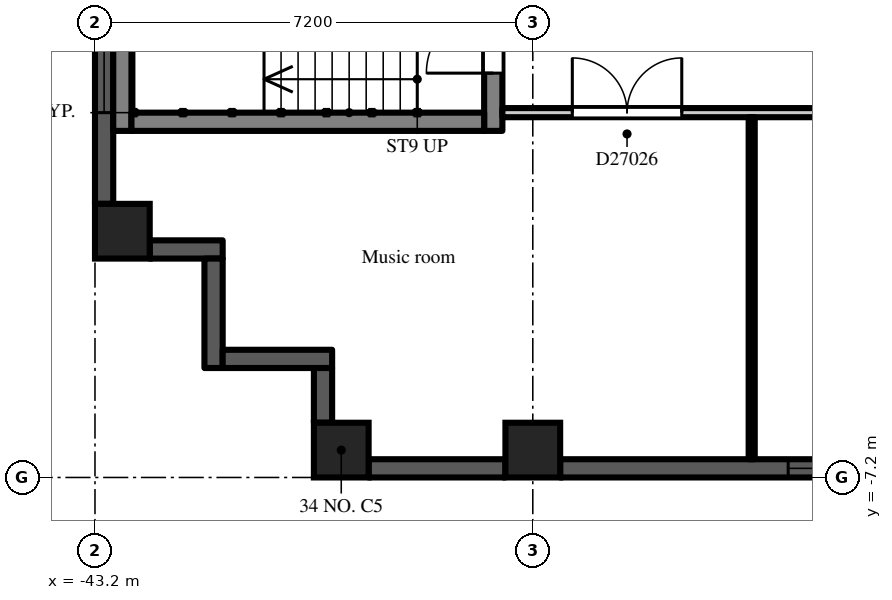
"""IFC4 building model, lengths in metres.
Left out: names, types, materials, properties, quantities, classifications, styles, units other than length and angle.
Written with IfcOpenShell. Run it as: python <this file> out.ifc"""

import sys

from ifc_helpers import new_model, si_unit, direction, frame, frame_2d, origin, origin_2d, place, context, subcontext, project, spatial, rectangle, extrude, element, fill, save


model = new_model("IFC4")
c1 = context("Model", 3, precision=1e-05, world=origin(), true_north=direction((0.0, 1.0)))
c2 = subcontext(c1, "Body", "Model", "MODEL_VIEW")
j1 = project(units=[si_unit("LENGTHUNIT", "METRE"), si_unit("PLANEANGLEUNIT", "RADIAN")], contexts=[c1])
p1 = place(None, origin())
s1 = spatial("IfcSite", under=j1, at=p1, CompositionType="ELEMENT")
p2 = place(p1, origin())
s2 = spatial("IfcBuilding", under=s1, at=p2, CompositionType="ELEMENT")
p3 = place(p2, frame((0.0, 0.0, 188.7)))
s3 = spatial("IfcBuildingStorey", under=s2, at=p3, CompositionType="ELEMENT", Elevation=188.7)
for number, where, z_axis, x_axis in (
    (1, (-42.75, -3.15, 0.0), (0.0, 0.0, 1.0), (1.0, 0.0, 0.0)),
    (2, (-39.15, -6.75, 0.0), (0.0, 0.0, 1.0), (1.0, 0.0, 0.0)),
    (3, (-36.0, -6.75, 0.0), (0.0, 0.0, 1.0), (1.0, 0.0, 0.0)),
):
    element("IfcColumn", number, at=place(p3, frame(where, z_axis=z_axis, x_axis=x_axis)), inside=s3, PredefinedType="COLUMN", context=c2, shape_type="SweptSolid", body=[
        extrude(rectangle(XDim=0.9, YDim=0.9, at=origin_2d()), origin(), (0.0, 0.0, 1.0), 3.0),
    ])
p4 = place(p3, frame((-43.05, 2.7, 0.0), z_axis=(0.0, 0.0, 1.0), x_axis=(0.0, -1.0, 0.0)))
e4 = element("IfcWall", 4, at=p4, inside=s3, PredefinedType="SOLIDWALL", context=c2, shape_type="SweptSolid", body=[
    extrude(rectangle(XDim=5.4, YDim=0.3, at=frame_2d((2.7, 0.0))), origin(), (0.0, 0.0, 1.0), 2.2),
])
p5 = place(p4, frame((1.5, 0.0, 0.2)))
e5 = element("IfcOpeningElement", 5, at=p5, cuts=e4, PredefinedType="OPENING", context=c2, shape_type="SweptSolid", body=[
    extrude(rectangle(XDim=2.4, YDim=1.85, at=frame_2d((1.2, 0.925))), frame((0.0, 0.16, 0.0), z_axis=(0.0, -1.0, 0.0), x_axis=(1.0, 0.0, 0.0)), (0.0, 0.0, 1.0), 0.32),
])
p6 = place(p4, frame((0.15, 0.0, 0.2)))
e6 = element("IfcOpeningElement", 6, at=p6, cuts=e4, PredefinedType="OPENING", context=c2, shape_type="SweptSolid", body=[
    extrude(rectangle(XDim=1.2, YDim=1.85, at=frame_2d((0.6, 0.925))), frame((0.0, 0.16, 0.0), z_axis=(0.0, -1.0, 0.0), x_axis=(1.0, 0.0, 0.0)), (0.0, 0.0, 1.0), 0.32),
])
p7 = place(p3, frame((-42.3, -3.45, 0.0), z_axis=(0.0, 0.0, 1.0), x_axis=(1.0, 0.0, 0.0)))
e7 = element("IfcWall", 7, at=p7, inside=s3, PredefinedType="SOLIDWALL", context=c2, shape_type="SweptSolid", body=[
    extrude(rectangle(XDim=1.2, YDim=0.3, at=frame_2d((0.6, 0.0))), origin(), (0.0, 0.0, 1.0), 2.6),
])
p8 = place(p3, frame((-41.25, -3.6, 0.0), z_axis=(0.0, 0.0, 1.0), x_axis=(0.0, -1.0, 0.0)))
e8 = element("IfcWall", 8, at=p8, inside=s3, PredefinedType="SOLIDWALL", context=c2, shape_type="SweptSolid", body=[
    extrude(rectangle(XDim=1.8, YDim=0.3, at=frame_2d((0.9, 0.0))), origin(), (0.0, 0.0, 1.0), 2.6),
])
p9 = place(p3, frame((-41.1, -5.25, 0.0), z_axis=(0.0, 0.0, 1.0), x_axis=(1.0, 0.0, 0.0)))
e9 = element("IfcWall", 9, at=p9, inside=s3, PredefinedType="SOLIDWALL", context=c2, shape_type="SweptSolid", body=[
    extrude(rectangle(XDim=1.8, YDim=0.3, at=frame_2d((0.9, 0.0))), origin(), (0.0, 0.0, 1.0), 2.6),
])
p10 = place(p3, frame((-39.45, -5.4, 0.0), z_axis=(0.0, 0.0, 1.0), x_axis=(0.0, -1.0, 0.0)))
e10 = element("IfcWall", 10, at=p10, inside=s3, PredefinedType="SOLIDWALL", context=c2, shape_type="SweptSolid", body=[
    extrude(rectangle(XDim=0.9, YDim=0.3, at=frame_2d((0.45, 0.0))), origin(), (0.0, 0.0, 1.0), 2.6),
])
p11 = place(p3, frame((-38.7, -7.05, 0.0), z_axis=(0.0, 0.0, 1.0), x_axis=(1.0, 0.0, 0.0)))
e11 = element("IfcWall", 11, at=p11, inside=s3, PredefinedType="SOLIDWALL", context=c2, shape_type="SweptSolid", body=[
    extrude(rectangle(XDim=2.25, YDim=0.3, at=frame_2d((1.125, 0.0))), origin(), (0.0, 0.0, 1.0), 2.2),
])
p12 = place(p3, frame((-35.55, -7.05, 0.0), z_axis=(0.0, 0.0, 1.0), x_axis=(1.0, 0.0, 0.0)))
e12 = element("IfcWall", 12, at=p12, inside=s3, PredefinedType="SOLIDWALL", context=c2, shape_type="SweptSolid", body=[
    extrude(rectangle(XDim=6.3, YDim=0.3, at=frame_2d((3.15, 0.0))), origin(), (0.0, 0.0, 1.0), 2.2),
])
p13 = place(p12, frame((3.75, 0.0, 0.2)))
e13 = element("IfcOpeningElement", 13, at=p13, cuts=e12, PredefinedType="OPENING", context=c2, shape_type="SweptSolid", body=[
    extrude(rectangle(XDim=2.4, YDim=1.85, at=frame_2d((1.2, 0.925))), frame((0.0, 0.16, 0.0), z_axis=(0.0, -1.0, 0.0), x_axis=(1.0, 0.0, 0.0)), (0.0, 0.0, 1.0), 0.32),
])
p14 = place(p3, frame((-36.65, -1.5, 0.0), z_axis=(0.0, 0.0, 1.0), x_axis=(0.0, 1.0, 0.0)))
e14 = element("IfcWall", 14, at=p14, inside=s3, PredefinedType="SHEAR", context=c2, shape_type="SweptSolid", body=[
    extrude(rectangle(XDim=3.0, YDim=0.3, at=frame_2d((1.5, 0.0))), origin(), (0.0, 0.0, 1.0), 2.6),
])
p15 = place(p14, frame((0.95, 0.0, 0.0)))
e15 = element("IfcOpeningElement", 15, at=p15, cuts=e14, PredefinedType="OPENING", context=c2, shape_type="SweptSolid", body=[
    extrude(rectangle(XDim=1.1, YDim=2.1, at=frame_2d((0.55, 1.05))), frame((0.0, 0.16, 0.0), z_axis=(0.0, -1.0, 0.0), x_axis=(1.0, 0.0, 0.0)), (0.0, 0.0, 1.0), 0.32),
])
p16 = place(p3, frame((-42.75, -1.5, 0.0), z_axis=(0.0, 0.0, 1.0), x_axis=(0.0, 1.0, 0.0)))
e16 = element("IfcWall", 16, at=p16, inside=s3, PredefinedType="SHEAR", context=c2, shape_type="SweptSolid", body=[
    extrude(rectangle(XDim=3.0, YDim=0.3, at=frame_2d((1.5, 0.0))), origin(), (0.0, 0.0, 1.0), 2.6),
])
p17 = place(p3, frame((-36.8, -1.35, 0.0), z_axis=(0.0, 0.0, 1.0), x_axis=(-1.0, 0.0, 0.0)))
e17 = element("IfcWall", 17, at=p17, inside=s3, PredefinedType="SHEAR", context=c2, shape_type="SweptSolid", body=[
    extrude(rectangle(XDim=5.8, YDim=0.3, at=frame_2d((2.9, 0.0))), origin(), (0.0, 0.0, 1.0), 2.6),
])
p18 = place(p3, frame((-36.5, -1.2, 0.0), z_axis=(0.0, 0.0, 1.0), x_axis=(1.0, 0.0, 0.0)))
e18 = element("IfcWall", 18, at=p18, inside=s3, PredefinedType="PARTITIONING", context=c2, shape_type="SweptSolid", body=[
    extrude(rectangle(XDim=14.9, YDim=0.15, at=frame_2d((7.45, 0.0))), origin(), (0.0, 0.0, 1.0), 2.6),
])
p19 = place(p18, frame((12.65, 0.0, 0.0)))
e19 = element("IfcOpeningElement", 19, at=p19, cuts=e18, PredefinedType="OPENING", context=c2, shape_type="SweptSolid", body=[
    extrude(rectangle(XDim=0.9, YDim=2.1, at=frame_2d((0.45, 1.05))), frame((0.0, 0.085, 0.0), z_axis=(0.0, -1.0, 0.0), x_axis=(1.0, 0.0, 0.0)), (0.0, 0.0, 1.0), 0.17),
])
p20 = place(p18, frame((9.05, 0.0, 0.0)))
e20 = element("IfcOpeningElement", 20, at=p20, cuts=e18, PredefinedType="OPENING", context=c2, shape_type="SweptSolid", body=[
    extrude(rectangle(XDim=0.9, YDim=2.1, at=frame_2d((0.45, 1.05))), frame((0.0, 0.085, 0.0), z_axis=(0.0, -1.0, 0.0), x_axis=(1.0, 0.0, 0.0)), (0.0, 0.0, 1.0), 0.17),
])
p21 = place(p18, frame((5.45, 0.0, 0.0)))
e21 = element("IfcOpeningElement", 21, at=p21, cuts=e18, PredefinedType="OPENING", context=c2, shape_type="SweptSolid", body=[
    extrude(rectangle(XDim=0.9, YDim=2.1, at=frame_2d((0.45, 1.05))), frame((0.0, 0.085, 0.0), z_axis=(0.0, -1.0, 0.0), x_axis=(1.0, 0.0, 0.0)), (0.0, 0.0, 1.0), 0.17),
])
p22 = place(p18, frame((1.15, 0.0, 0.0)))
e22 = element("IfcOpeningElement", 22, at=p22, cuts=e18, PredefinedType="OPENING", context=c2, shape_type="SweptSolid", body=[
    extrude(rectangle(XDim=1.8, YDim=2.1, at=frame_2d((0.9, 1.05))), frame((0.0, 0.085, 0.0), z_axis=(0.0, -1.0, 0.0), x_axis=(1.0, 0.0, 0.0)), (0.0, 0.0, 1.0), 0.17),
])
p23 = place(p3, frame((-32.4, -6.9, 0.0), z_axis=(0.0, 0.0, 1.0), x_axis=(0.0, 1.0, 0.0)))
e23 = element("IfcWall", 23, at=p23, inside=s3, PredefinedType="PARTITIONING", context=c2, shape_type="SweptSolid", body=[
    extrude(rectangle(XDim=5.625, YDim=0.1, at=frame_2d((2.812, 0.0))), origin(), (0.0, 0.0, 1.0), 2.6),
])
p24 = place(p5, origin())
e24 = element("IfcWindow", 24, at=p24, inside=s3, PartitioningType="SINGLE_PANEL", PredefinedType="WINDOW", context=c2, shape_type="SweptSolid", body=[
    extrude(rectangle(XDim=2.4, YDim=1.85, at=frame_2d((1.2, 0.925))), frame((0.0, 0.03, 0.0), z_axis=(0.0, -1.0, 0.0), x_axis=(1.0, 0.0, 0.0)), (0.0, 0.0, 1.0), 0.06),
])
fill(e5, e24)
p25 = place(p13, origin())
e25 = element("IfcWindow", 25, at=p25, inside=s3, PartitioningType="SINGLE_PANEL", PredefinedType="WINDOW", context=c2, shape_type="SweptSolid", body=[
    extrude(rectangle(XDim=2.4, YDim=1.85, at=frame_2d((1.2, 0.925))), frame((0.0, 0.03, 0.0), z_axis=(0.0, -1.0, 0.0), x_axis=(1.0, 0.0, 0.0)), (0.0, 0.0, 1.0), 0.06),
])
fill(e13, e25)
p26 = place(p15, origin())
e26 = element("IfcDoor", 26, at=p26, inside=s3, OperationType="SINGLE_SWING_LEFT", PredefinedType="DOOR", context=c2, shape_type="SweptSolid", body=[
    extrude(rectangle(XDim=1.1, YDim=2.1, at=frame_2d((0.55, 1.05))), frame((0.0, 0.025, 0.0), z_axis=(0.0, -1.0, 0.0), x_axis=(1.0, 0.0, 0.0)), (0.0, 0.0, 1.0), 0.05),
])
fill(e15, e26)
p27 = place(p22, origin())
e27 = element("IfcDoor", 27, at=p27, inside=s3, OperationType="DOUBLE_DOOR_DOUBLE_SWING", PredefinedType="DOOR", context=c2, shape_type="SweptSolid", body=[
    extrude(rectangle(XDim=1.8, YDim=2.1, at=frame_2d((0.9, 1.05))), frame((0.0, 0.025, 0.0), z_axis=(0.0, -1.0, 0.0), x_axis=(1.0, 0.0, 0.0)), (0.0, 0.0, 1.0), 0.05),
])
fill(e22, e27)
save(model, sys.argv[1])
